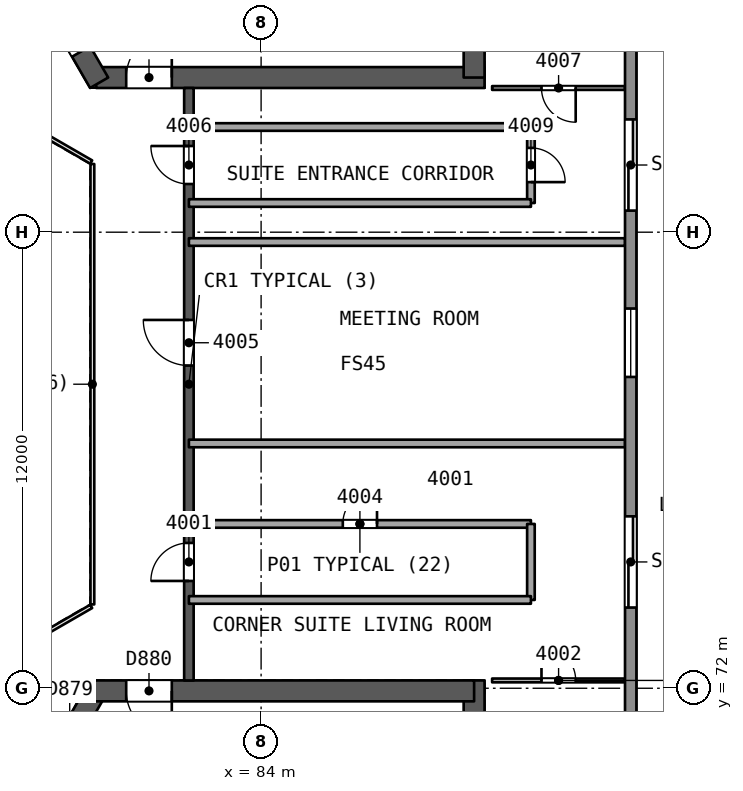
"""IFC4 building model, lengths in metres.
Left out: names, types, materials, properties, quantities, classifications, styles, units other than length and angle.
Written with IfcOpenShell. Run it as: python <this file> out.ifc"""

import sys

from ifc_helpers import new_model, si_unit, direction, frame, frame_2d, origin, place, context, subcontext, project, spatial, rectangle, extrude, element, fill, save


model = new_model("IFC4")
c1 = context("Model", 3, precision=1e-05, world=origin(), true_north=direction((0.0, 1.0)))
c2 = subcontext(c1, "Body", "Model", "MODEL_VIEW")
j1 = project(units=[si_unit("LENGTHUNIT", "METRE"), si_unit("PLANEANGLEUNIT", "RADIAN")], contexts=[c1])
p1 = place(None, origin())
s1 = spatial("IfcSite", under=j1, at=p1, CompositionType="ELEMENT")
p2 = place(p1, origin())
s2 = spatial("IfcBuilding", under=s1, at=p2, CompositionType="ELEMENT")
p3 = place(p2, frame((0.0, 0.0, 167.4)))
s3 = spatial("IfcBuildingStorey", under=s2, at=p3, CompositionType="ELEMENT", Elevation=167.4)
p4 = place(p3, frame((79.659, 88.069, 0.0), z_axis=(0.0, 0.0, 1.0), x_axis=(1.0, 0.0, 0.0)))
e1 = element("IfcWall", 1, at=p4, inside=s3, PredefinedType="SHEAR", context=c2, shape_type="SweptSolid", body=[
    extrude(rectangle(XDim=10.221, YDim=0.55, at=frame_2d((5.111, 0.0))), origin(), (0.0, 0.0, 1.0), 3.7),
])
p5 = place(p4, frame((0.791, 0.0, 0.0)))
e2 = element("IfcOpeningElement", 2, at=p5, cuts=e1, PredefinedType="OPENING", context=c2, shape_type="SweptSolid", body=[
    extrude(rectangle(XDim=1.2, YDim=2.1, at=frame_2d((0.6, 1.05))), frame((0.0, 0.286, 0.0), z_axis=(0.0, -1.0, 0.0), x_axis=(1.0, 0.0, 0.0)), (0.0, 0.0, 1.0), 0.571),
])
p6 = place(p3, frame((89.605, 88.069, 0.0), z_axis=(0.0, 0.0, 1.0), x_axis=(0.0, 1.0, 0.0)))
e3 = element("IfcWall", 3, at=p6, inside=s3, PredefinedType="SHEAR", context=c2, shape_type="SweptSolid", body=[
    extrude(rectangle(XDim=14.058, YDim=0.55, at=frame_2d((7.029, 0.0))), origin(), (0.0, 0.0, 1.0), 3.7),
])
p7 = place(p3, frame((74.686, 96.683, 0.0), z_axis=(0.0, 0.0, 1.0), x_axis=(0.499997818338, -0.866026663364, 0.0)))
e4 = element("IfcWall", 4, at=p7, inside=s3, PredefinedType="SHEAR", context=c2, shape_type="SweptSolid", body=[
    extrude(rectangle(XDim=10.105, YDim=0.55, at=frame_2d((5.052, 0.0))), origin(), (0.0, 0.0, 1.0), 3.7),
])
p8 = place(p7, frame((7.955, 0.0, 0.0)))
e5 = element("IfcOpeningElement", 5, at=p8, cuts=e4, PredefinedType="OPENING", context=c2, shape_type="SweptSolid", body=[
    extrude(rectangle(XDim=1.2, YDim=2.1, at=frame_2d((0.6, 1.05))), frame((0.0, 0.286, 0.0), z_axis=(0.0, -1.0, 0.0), x_axis=(1.0, 0.0, 0.0)), (0.0, 0.0, 1.0), 0.571),
])
p9 = place(p3, frame((79.659, 71.931, 0.0), z_axis=(0.0, 0.0, 1.0), x_axis=(-0.500000202252, -0.866025287014, 0.0)))
e6 = element("IfcWall", 6, at=p9, inside=s3, PredefinedType="SHEAR", context=c2, shape_type="SweptSolid", body=[
    extrude(rectangle(XDim=10.221, YDim=0.55, at=frame_2d((5.111, 0.0))), origin(), (0.0, 0.0, 1.0), 3.7),
])
p10 = place(p9, frame((0.791, 0.0, 0.0)))
e7 = element("IfcOpeningElement", 7, at=p10, cuts=e6, PredefinedType="OPENING", context=c2, shape_type="SweptSolid", body=[
    extrude(rectangle(XDim=1.2, YDim=2.1, at=frame_2d((0.6, 1.05))), frame((0.0, 0.286, 0.0), z_axis=(0.0, -1.0, 0.0), x_axis=(1.0, 0.0, 0.0)), (0.0, 0.0, 1.0), 0.571),
])
p11 = place(p3, frame((89.605, 58.031, 0.0), z_axis=(0.0, 0.0, 1.0), x_axis=(0.0, 1.0, 0.0)))
e8 = element("IfcWall", 8, at=p11, inside=s3, PredefinedType="SHEAR", context=c2, shape_type="SweptSolid", body=[
    extrude(rectangle(XDim=14.175, YDim=0.55, at=frame_2d((7.087, 0.0))), origin(), (0.0, 0.0, 1.0), 3.7),
])
p12 = place(p3, frame((89.605, 71.931, 0.0), z_axis=(0.0, 0.0, 1.0), x_axis=(-1.0, 0.0, 0.0)))
e9 = element("IfcWall", 9, at=p12, inside=s3, PredefinedType="SHEAR", context=c2, shape_type="SweptSolid", body=[
    extrude(rectangle(XDim=10.105, YDim=0.55, at=frame_2d((5.052, 0.0))), origin(), (0.0, 0.0, 1.0), 3.7),
])
p13 = place(p12, frame((7.955, 0.0, 0.0)))
e10 = element("IfcOpeningElement", 10, at=p13, cuts=e9, PredefinedType="OPENING", context=c2, shape_type="SweptSolid", body=[
    extrude(rectangle(XDim=1.2, YDim=2.1, at=frame_2d((0.6, 1.05))), frame((0.0, 0.286, 0.0), z_axis=(0.0, -1.0, 0.0), x_axis=(1.0, 0.0, 0.0)), (0.0, 0.0, 1.0), 0.571),
])
p14 = place(p3, frame((82.1, 72.206, 0.0), z_axis=(0.0, 0.0, 1.0), x_axis=(0.0, 1.0, 0.0)))
e11 = element("IfcWall", 11, at=p14, inside=s3, PredefinedType="SHEAR", context=c2, shape_type="SweptSolid", body=[
    extrude(rectangle(XDim=15.588, YDim=0.25, at=frame_2d((7.794, 0.0))), origin(), (0.0, 0.0, 1.0), 3.25),
])
p15 = place(p14, frame((2.618, 0.0, 0.0)))
e12 = element("IfcOpeningElement", 12, at=p15, cuts=e11, PredefinedType="OPENING", context=c2, shape_type="SweptSolid", body=[
    extrude(rectangle(XDim=1.0, YDim=2.1, at=frame_2d((0.5, 1.05))), frame((0.0, 0.135, 0.0), z_axis=(0.0, -1.0, 0.0), x_axis=(1.0, 0.0, 0.0)), (0.0, 0.0, 1.0), 0.271),
])
p16 = place(p14, frame((8.285, 0.0, 0.0)))
e13 = element("IfcOpeningElement", 13, at=p16, cuts=e11, PredefinedType="OPENING", context=c2, shape_type="SweptSolid", body=[
    extrude(rectangle(XDim=1.2, YDim=2.4, at=frame_2d((0.6, 1.2))), frame((0.0, 0.135, 0.0), z_axis=(0.0, -1.0, 0.0), x_axis=(1.0, 0.0, 0.0)), (0.0, 0.0, 1.0), 0.271),
])
p17 = place(p14, frame((13.062, 0.0, 0.0)))
e14 = element("IfcOpeningElement", 14, at=p17, cuts=e11, PredefinedType="OPENING", context=c2, shape_type="SweptSolid", body=[
    extrude(rectangle(XDim=1.0, YDim=2.1, at=frame_2d((0.5, 1.05))), frame((0.0, 0.135, 0.0), z_axis=(0.0, -1.0, 0.0), x_axis=(1.0, 0.0, 0.0)), (0.0, 0.0, 1.0), 0.271),
])
p18 = place(p3, frame((90.079, 72.206, 0.0), z_axis=(0.0, 0.0, 1.0), x_axis=(1.0, 0.0, 0.0)))
e15 = element("IfcWall", 15, at=p18, inside=s3, PredefinedType="PARTITIONING", context=c2, shape_type="SweptSolid", body=[
    extrude(rectangle(XDim=3.498, YDim=0.1, at=frame_2d((1.749, 0.0))), origin(), (0.0, 0.0, 1.0), 3.25),
])
p19 = place(p18, frame((1.299, 0.0, 0.0)))
e16 = element("IfcOpeningElement", 16, at=p19, cuts=e15, PredefinedType="OPENING", context=c2, shape_type="SweptSolid", body=[
    extrude(rectangle(XDim=0.9, YDim=2.1, at=frame_2d((0.45, 1.05))), frame((0.0, 0.061, 0.0), z_axis=(0.0, -1.0, 0.0), x_axis=(1.0, 0.0, 0.0)), (0.0, 0.0, 1.0), 0.121),
])
p20 = place(p3, frame((82.1, 76.323, 0.0), z_axis=(0.0, 0.0, 1.0), x_axis=(1.0, 0.0, 0.0)))
e17 = element("IfcWall", 17, at=p20, inside=s3, PredefinedType="PARTITIONING", context=c2, shape_type="SweptSolid", body=[
    extrude(rectangle(XDim=9.0, YDim=0.2, at=frame_2d((4.5, 0.0))), origin(), (0.0, 0.0, 1.0), 3.25),
])
p21 = place(p20, frame((4.05, 0.0, 0.0)))
e18 = element("IfcOpeningElement", 18, at=p21, cuts=e17, PredefinedType="OPENING", context=c2, shape_type="SweptSolid", body=[
    extrude(rectangle(XDim=0.9, YDim=2.1, at=frame_2d((0.45, 1.05))), frame((0.0, 0.11, 0.0), z_axis=(0.0, -1.0, 0.0), x_axis=(1.0, 0.0, 0.0)), (0.0, 0.0, 1.0), 0.221),
])
p22 = place(p3, frame((91.1, 76.323, 0.0), z_axis=(0.0, 0.0, 1.0), x_axis=(0.0, -1.0, 0.0)))
e19 = element("IfcWall", 19, at=p22, inside=s3, PredefinedType="PARTITIONING", context=c2, shape_type="SweptSolid", body=[
    extrude(rectangle(XDim=2.0, YDim=0.2, at=frame_2d((1.0, 0.0))), origin(), (0.0, 0.0, 1.0), 3.25),
])
p23 = place(p3, frame((91.1, 74.323, 0.0), z_axis=(0.0, 0.0, 1.0), x_axis=(-1.0, 0.0, 0.0)))
e20 = element("IfcWall", 20, at=p23, inside=s3, PredefinedType="PARTITIONING", context=c2, shape_type="SweptSolid", body=[
    extrude(rectangle(XDim=9.0, YDim=0.2, at=frame_2d((4.5, 0.0))), origin(), (0.0, 0.0, 1.0), 3.25),
])
for number, where, z_axis, x_axis in (
    (21, (93.577, 78.441, 0.0), (0.0, 0.0, 1.0), (-1.0, 0.0, 0.0)),
    (22, (93.577, 83.741, 0.0), (0.0, 0.0, 1.0), (-1.0, 0.0, 0.0)),
):
    element("IfcWall", number, at=place(p3, frame(where, z_axis=z_axis, x_axis=x_axis)), inside=s3, PredefinedType="PARTITIONING", context=c2, shape_type="SweptSolid", body=[
        extrude(rectangle(XDim=11.477, YDim=0.2, at=frame_2d((5.739, 0.0))), origin(), (0.0, 0.0, 1.0), 3.25),
    ])
p24 = place(p3, frame((93.577, 87.794, 0.0), z_axis=(0.0, 0.0, 1.0), x_axis=(-1.0, 0.0, 0.0)))
e23 = element("IfcWall", 23, at=p24, inside=s3, PredefinedType="PARTITIONING", context=c2, shape_type="SweptSolid", body=[
    extrude(rectangle(XDim=3.498, YDim=0.1, at=frame_2d((1.749, 0.0))), origin(), (0.0, 0.0, 1.0), 3.25),
])
p25 = place(p24, frame((1.299, 0.0, 0.0)))
e24 = element("IfcOpeningElement", 24, at=p25, cuts=e23, PredefinedType="OPENING", context=c2, shape_type="SweptSolid", body=[
    extrude(rectangle(XDim=0.9, YDim=2.1, at=frame_2d((0.45, 1.05))), frame((0.0, 0.061, 0.0), z_axis=(0.0, -1.0, 0.0), x_axis=(1.0, 0.0, 0.0)), (0.0, 0.0, 1.0), 0.121),
])
p26 = place(p3, frame((82.1, 86.768, 0.0), z_axis=(0.0, 0.0, 1.0), x_axis=(1.0, 0.0, 0.0)))
e25 = element("IfcWall", 25, at=p26, inside=s3, PredefinedType="PARTITIONING", context=c2, shape_type="SweptSolid", body=[
    extrude(rectangle(XDim=9.0, YDim=0.2, at=frame_2d((4.5, 0.0))), origin(), (0.0, 0.0, 1.0), 3.25),
])
p27 = place(p3, frame((91.1, 86.768, 0.0), z_axis=(0.0, 0.0, 1.0), x_axis=(0.0, -1.0, 0.0)))
e26 = element("IfcWall", 26, at=p27, inside=s3, PredefinedType="PARTITIONING", context=c2, shape_type="SweptSolid", body=[
    extrude(rectangle(XDim=2.0, YDim=0.2, at=frame_2d((1.0, 0.0))), origin(), (0.0, 0.0, 1.0), 3.25),
])
p28 = place(p27, frame((0.55, 0.0, 0.0)))
e27 = element("IfcOpeningElement", 27, at=p28, cuts=e26, PredefinedType="OPENING", context=c2, shape_type="SweptSolid", body=[
    extrude(rectangle(XDim=0.9, YDim=2.1, at=frame_2d((0.45, 1.05))), frame((0.0, 0.11, 0.0), z_axis=(0.0, -1.0, 0.0), x_axis=(1.0, 0.0, 0.0)), (0.0, 0.0, 1.0), 0.221),
])
p29 = place(p3, frame((91.1, 84.768, 0.0), z_axis=(0.0, 0.0, 1.0), x_axis=(-1.0, 0.0, 0.0)))
e28 = element("IfcWall", 28, at=p29, inside=s3, PredefinedType="PARTITIONING", context=c2, shape_type="SweptSolid", body=[
    extrude(rectangle(XDim=9.0, YDim=0.2, at=frame_2d((4.5, 0.0))), origin(), (0.0, 0.0, 1.0), 3.25),
])
p30 = place(p3, frame((93.726, 106.925, 0.0), z_axis=(0.0, 0.0, 1.0), x_axis=(0.0, -1.0, 0.0)))
e29 = element("IfcWall", 29, at=p30, inside=s3, PredefinedType="SOLIDWALL", context=c2, shape_type="SweptSolid", body=[
    extrude(rectangle(XDim=53.85, YDim=0.3, at=frame_2d((26.925, 0.0))), origin(), (0.0, 0.0, 1.0), 3.25),
])
p31 = place(p30, frame((30.401, 0.0, 0.0)))
e30 = element("IfcOpeningElement", 30, at=p31, cuts=e29, PredefinedType="OPENING", context=c2, shape_type="SweptSolid", body=[
    extrude(rectangle(XDim=2.4, YDim=2.4, at=frame_2d((1.2, 1.2))), frame((0.0, 0.161, 0.0), z_axis=(0.0, -1.0, 0.0), x_axis=(1.0, 0.0, 0.0)), (0.0, 0.0, 1.0), 0.321),
])
p32 = place(p30, frame((41.847, 0.0, 0.0)))
e31 = element("IfcOpeningElement", 31, at=p32, cuts=e29, PredefinedType="OPENING", context=c2, shape_type="SweptSolid", body=[
    extrude(rectangle(XDim=2.4, YDim=2.4, at=frame_2d((1.2, 1.2))), frame((0.0, 0.161, 0.0), z_axis=(0.0, -1.0, 0.0), x_axis=(1.0, 0.0, 0.0)), (0.0, 0.0, 1.0), 0.321),
])
p33 = place(p30, frame((19.957, 0.0, 0.0)))
e32 = element("IfcOpeningElement", 32, at=p33, cuts=e29, PredefinedType="OPENING", context=c2, shape_type="SweptSolid", body=[
    extrude(rectangle(XDim=2.4, YDim=2.4, at=frame_2d((1.2, 1.2))), frame((0.0, 0.161, 0.0), z_axis=(0.0, -1.0, 0.0), x_axis=(1.0, 0.0, 0.0)), (0.0, 0.0, 1.0), 0.321),
])
p34 = place(p30, frame((9.622, 0.0, 0.0)))
e33 = element("IfcOpeningElement", 33, at=p34, cuts=e29, PredefinedType="OPENING", context=c2, shape_type="SweptSolid", body=[
    extrude(rectangle(XDim=2.4, YDim=2.4, at=frame_2d((1.2, 1.2))), frame((0.0, 0.161, 0.0), z_axis=(0.0, -1.0, 0.0), x_axis=(1.0, 0.0, 0.0)), (0.0, 0.0, 1.0), 0.321),
])
p35 = place(p30, frame((24.934, 0.0, 0.9)))
e34 = element("IfcOpeningElement", 34, at=p35, cuts=e29, PredefinedType="OPENING", context=c2, shape_type="SweptSolid", body=[
    extrude(rectangle(XDim=1.8, YDim=1.5, at=frame_2d((0.9, 0.75))), frame((0.0, 0.161, 0.0), z_axis=(0.0, -1.0, 0.0), x_axis=(1.0, 0.0, 0.0)), (0.0, 0.0, 1.0), 0.321),
])
p36 = place(p3, frame((42.319, 82.755, 0.0), z_axis=(0.0, 0.0, 1.0), x_axis=(0.866024017239, 0.50000240156, 0.0)))
e35 = element("IfcWall", 35, at=p36, inside=s3, PredefinedType="SOLIDWALL", context=c2, shape_type="SweptSolid", body=[
    extrude(rectangle(XDim=53.85, YDim=0.3, at=frame_2d((26.925, 0.0))), origin(), (0.0, 0.0, 1.0), 3.25),
])
p37 = place(p36, frame((20.581, 0.0, 0.0)))
e36 = element("IfcOpeningElement", 36, at=p37, cuts=e35, PredefinedType="OPENING", context=c2, shape_type="SweptSolid", body=[
    extrude(rectangle(XDim=2.4, YDim=2.4, at=frame_2d((1.2, 1.2))), frame((0.0, 0.161, 0.0), z_axis=(0.0, -1.0, 0.0), x_axis=(1.0, 0.0, 0.0)), (0.0, 0.0, 1.0), 0.321),
])
p38 = place(p36, frame((9.622, 0.0, 0.0)))
e37 = element("IfcOpeningElement", 37, at=p38, cuts=e35, PredefinedType="OPENING", context=c2, shape_type="SweptSolid", body=[
    extrude(rectangle(XDim=2.4, YDim=2.4, at=frame_2d((1.2, 1.2))), frame((0.0, 0.161, 0.0), z_axis=(0.0, -1.0, 0.0), x_axis=(1.0, 0.0, 0.0)), (0.0, 0.0, 1.0), 0.321),
])
p39 = place(p36, frame((40.79, 0.0, 0.0)))
e38 = element("IfcOpeningElement", 38, at=p39, cuts=e35, PredefinedType="OPENING", context=c2, shape_type="SweptSolid", body=[
    extrude(rectangle(XDim=2.4, YDim=2.4, at=frame_2d((1.2, 1.2))), frame((0.0, 0.161, 0.0), z_axis=(0.0, -1.0, 0.0), x_axis=(1.0, 0.0, 0.0)), (0.0, 0.0, 1.0), 0.321),
])
p40 = place(p36, frame((27.74, 0.0, 0.9)))
e39 = element("IfcOpeningElement", 39, at=p40, cuts=e35, PredefinedType="OPENING", context=c2, shape_type="SweptSolid", body=[
    extrude(rectangle(XDim=1.8, YDim=1.5, at=frame_2d((0.9, 0.75))), frame((0.0, 0.161, 0.0), z_axis=(0.0, -1.0, 0.0), x_axis=(1.0, 0.0, 0.0)), (0.0, 0.0, 1.0), 0.321),
])
p41 = place(p36, frame((24.934, 0.0, 0.9)))
e40 = element("IfcOpeningElement", 40, at=p41, cuts=e35, PredefinedType="OPENING", context=c2, shape_type="SweptSolid", body=[
    extrude(rectangle(XDim=1.8, YDim=1.5, at=frame_2d((0.9, 0.75))), frame((0.0, 0.161, 0.0), z_axis=(0.0, -1.0, 0.0), x_axis=(1.0, 0.0, 0.0)), (0.0, 0.0, 1.0), 0.321),
])
p42 = place(p3, frame((88.955, 50.32, 0.0), z_axis=(0.0, 0.0, 1.0), x_axis=(-0.866024017239, 0.50000240156, 0.0)))
e41 = element("IfcWall", 41, at=p42, inside=s3, PredefinedType="SOLIDWALL", context=c2, shape_type="SweptSolid", body=[
    extrude(rectangle(XDim=53.85, YDim=0.3, at=frame_2d((26.925, 0.0))), origin(), (0.0, 0.0, 1.0), 3.25),
])
p43 = place(p42, frame((30.557, 0.0, 0.0)))
e42 = element("IfcOpeningElement", 42, at=p43, cuts=e41, PredefinedType="OPENING", context=c2, shape_type="SweptSolid", body=[
    extrude(rectangle(XDim=2.4, YDim=2.4, at=frame_2d((1.2, 1.2))), frame((0.0, 0.161, 0.0), z_axis=(0.0, -1.0, 0.0), x_axis=(1.0, 0.0, 0.0)), (0.0, 0.0, 1.0), 0.321),
])
p44 = place(p42, frame((41.847, 0.0, 0.0)))
e43 = element("IfcOpeningElement", 43, at=p44, cuts=e41, PredefinedType="OPENING", context=c2, shape_type="SweptSolid", body=[
    extrude(rectangle(XDim=2.4, YDim=2.4, at=frame_2d((1.2, 1.2))), frame((0.0, 0.161, 0.0), z_axis=(0.0, -1.0, 0.0), x_axis=(1.0, 0.0, 0.0)), (0.0, 0.0, 1.0), 0.321),
])
p45 = place(p42, frame((10.349, 0.0, 0.0)))
e44 = element("IfcOpeningElement", 44, at=p45, cuts=e41, PredefinedType="OPENING", context=c2, shape_type="SweptSolid", body=[
    extrude(rectangle(XDim=2.4, YDim=2.4, at=frame_2d((1.2, 1.2))), frame((0.0, 0.161, 0.0), z_axis=(0.0, -1.0, 0.0), x_axis=(1.0, 0.0, 0.0)), (0.0, 0.0, 1.0), 0.321),
])
p46 = place(p42, frame((25.09, 0.0, 0.9)))
e45 = element("IfcOpeningElement", 45, at=p46, cuts=e41, PredefinedType="OPENING", context=c2, shape_type="SweptSolid", body=[
    extrude(rectangle(XDim=1.8, YDim=1.5, at=frame_2d((0.9, 0.75))), frame((0.0, 0.161, 0.0), z_axis=(0.0, -1.0, 0.0), x_axis=(1.0, 0.0, 0.0)), (0.0, 0.0, 1.0), 0.321),
])
p47 = place(p3, frame((79.56, 74.206, 0.0), z_axis=(0.0, 0.0, 1.0), x_axis=(0.0, 1.0, 0.0)))
e46 = element("IfcWall", 46, at=p47, inside=s3, PredefinedType="PARTITIONING", context=c2, shape_type="SweptSolid", body=[
    extrude(rectangle(XDim=11.588, YDim=0.1, at=frame_2d((5.794, 0.0))), origin(), (0.0, 0.0, 1.0), 3.25),
])
for number, where, z_axis, x_axis in (
    (47, (79.53, 85.846, 0.0), (0.0, 0.0, 1.0), (-0.866, 0.5, 0.0)),
    (48, (77.798, 73.154, 0.0), (0.0, 0.0, 1.0), (0.866, 0.5, 0.0)),
):
    element("IfcWall", number, at=place(p3, frame(where, z_axis=z_axis, x_axis=x_axis)), inside=s3, PredefinedType="PARTITIONING", context=c2, shape_type="SweptSolid", body=[
        extrude(rectangle(XDim=2.0, YDim=0.1, at=frame_2d((1.0, 0.0))), origin(), (0.0, 0.0, 1.0), 3.25),
    ])
p48 = place(p15, origin())
e49 = element("IfcDoor", 49, at=p48, inside=s3, OperationType="SINGLE_SWING_LEFT", PredefinedType="NOTDEFINED", context=c2, shape_type="SweptSolid", body=[
    extrude(rectangle(XDim=1.0, YDim=2.1, at=frame_2d((0.5, 1.05))), frame((0.0, 0.025, 0.0), z_axis=(0.0, -1.0, 0.0), x_axis=(1.0, 0.0, 0.0)), (0.0, 0.0, 1.0), 0.05),
])
fill(e12, e49)
p49 = place(p19, origin())
e50 = element("IfcDoor", 50, at=p49, inside=s3, OperationType="SINGLE_SWING_LEFT", PredefinedType="NOTDEFINED", context=c2, shape_type="SweptSolid", body=[
    extrude(rectangle(XDim=0.9, YDim=2.1, at=frame_2d((0.45, 1.05))), frame((0.0, 0.025, 0.0), z_axis=(0.0, -1.0, 0.0), x_axis=(1.0, 0.0, 0.0)), (0.0, 0.0, 1.0), 0.05),
])
fill(e16, e50)
p50 = place(p21, origin())
e51 = element("IfcDoor", 51, at=p50, inside=s3, OperationType="SINGLE_SWING_RIGHT", PredefinedType="NOTDEFINED", context=c2, shape_type="SweptSolid", body=[
    extrude(rectangle(XDim=0.9, YDim=2.1, at=frame_2d((0.45, 1.05))), frame((0.0, 0.025, 0.0), z_axis=(0.0, -1.0, 0.0), x_axis=(1.0, 0.0, 0.0)), (0.0, 0.0, 1.0), 0.05),
])
fill(e18, e51)
p51 = place(p16, origin())
e52 = element("IfcDoor", 52, at=p51, inside=s3, OperationType="SINGLE_SWING_RIGHT", PredefinedType="NOTDEFINED", context=c2, shape_type="SweptSolid", body=[
    extrude(rectangle(XDim=1.2, YDim=2.4, at=frame_2d((0.6, 1.2))), frame((0.0, 0.025, 0.0), z_axis=(0.0, -1.0, 0.0), x_axis=(1.0, 0.0, 0.0)), (0.0, 0.0, 1.0), 0.05),
])
fill(e13, e52)
p52 = place(p17, origin())
e53 = element("IfcDoor", 53, at=p52, inside=s3, OperationType="SINGLE_SWING_RIGHT", PredefinedType="NOTDEFINED", context=c2, shape_type="SweptSolid", body=[
    extrude(rectangle(XDim=1.0, YDim=2.1, at=frame_2d((0.5, 1.05))), frame((0.0, 0.025, 0.0), z_axis=(0.0, -1.0, 0.0), x_axis=(1.0, 0.0, 0.0)), (0.0, 0.0, 1.0), 0.05),
])
fill(e14, e53)
p53 = place(p25, origin())
e54 = element("IfcDoor", 54, at=p53, inside=s3, OperationType="SINGLE_SWING_LEFT", PredefinedType="NOTDEFINED", context=c2, shape_type="SweptSolid", body=[
    extrude(rectangle(XDim=0.9, YDim=2.1, at=frame_2d((0.45, 1.05))), frame((0.0, 0.025, 0.0), z_axis=(0.0, -1.0, 0.0), x_axis=(1.0, 0.0, 0.0)), (0.0, 0.0, 1.0), 0.05),
])
fill(e24, e54)
p54 = place(p28, origin())
e55 = element("IfcDoor", 55, at=p54, inside=s3, OperationType="SINGLE_SWING_RIGHT", PredefinedType="NOTDEFINED", context=c2, shape_type="SweptSolid", body=[
    extrude(rectangle(XDim=0.9, YDim=2.1, at=frame_2d((0.45, 1.05))), frame((0.0, 0.025, 0.0), z_axis=(0.0, -1.0, 0.0), x_axis=(1.0, 0.0, 0.0)), (0.0, 0.0, 1.0), 0.05),
])
fill(e27, e55)
p55 = place(p31, origin())
e56 = element("IfcDoor", 56, at=p55, inside=s3, OperationType="SLIDING_TO_LEFT", PredefinedType="NOTDEFINED", context=c2, shape_type="SweptSolid", body=[
    extrude(rectangle(XDim=2.4, YDim=2.4, at=frame_2d((1.2, 1.2))), frame((0.0, 0.025, 0.0), z_axis=(0.0, -1.0, 0.0), x_axis=(1.0, 0.0, 0.0)), (0.0, 0.0, 1.0), 0.05),
])
fill(e30, e56)
p56 = place(p33, origin())
e57 = element("IfcDoor", 57, at=p56, inside=s3, OperationType="SLIDING_TO_LEFT", PredefinedType="NOTDEFINED", context=c2, shape_type="SweptSolid", body=[
    extrude(rectangle(XDim=2.4, YDim=2.4, at=frame_2d((1.2, 1.2))), frame((0.0, 0.025, 0.0), z_axis=(0.0, -1.0, 0.0), x_axis=(1.0, 0.0, 0.0)), (0.0, 0.0, 1.0), 0.05),
])
fill(e32, e57)
p57 = place(p35, origin())
e58 = element("IfcWindow", 58, at=p57, inside=s3, PartitioningType="SINGLE_PANEL", PredefinedType="WINDOW", context=c2, shape_type="SweptSolid", body=[
    extrude(rectangle(XDim=1.8, YDim=1.5, at=frame_2d((0.9, 0.75))), frame((0.0, 0.03, 0.0), z_axis=(0.0, -1.0, 0.0), x_axis=(1.0, 0.0, 0.0)), (0.0, 0.0, 1.0), 0.06),
])
fill(e34, e58)
p58 = place(p5, origin())
e59 = element("IfcDoor", 59, at=p58, inside=s3, OperationType="SINGLE_SWING_RIGHT", PredefinedType="NOTDEFINED", context=c2, shape_type="SweptSolid", body=[
    extrude(rectangle(XDim=1.2, YDim=2.1, at=frame_2d((0.6, 1.05))), frame((0.0, 0.025, 0.0), z_axis=(0.0, -1.0, 0.0), x_axis=(1.0, 0.0, 0.0)), (0.0, 0.0, 1.0), 0.05),
])
fill(e2, e59)
p59 = place(p8, origin())
e60 = element("IfcDoor", 60, at=p59, inside=s3, OperationType="SINGLE_SWING_LEFT", PredefinedType="NOTDEFINED", context=c2, shape_type="SweptSolid", body=[
    extrude(rectangle(XDim=1.2, YDim=2.1, at=frame_2d((0.6, 1.05))), frame((0.0, 0.025, 0.0), z_axis=(0.0, -1.0, 0.0), x_axis=(1.0, 0.0, 0.0)), (0.0, 0.0, 1.0), 0.05),
])
fill(e5, e60)
p60 = place(p13, origin())
e61 = element("IfcDoor", 61, at=p60, inside=s3, OperationType="SINGLE_SWING_LEFT", PredefinedType="NOTDEFINED", context=c2, shape_type="SweptSolid", body=[
    extrude(rectangle(XDim=1.2, YDim=2.1, at=frame_2d((0.6, 1.05))), frame((0.0, 0.025, 0.0), z_axis=(0.0, -1.0, 0.0), x_axis=(1.0, 0.0, 0.0)), (0.0, 0.0, 1.0), 0.05),
])
fill(e10, e61)
save(model, sys.argv[1])
